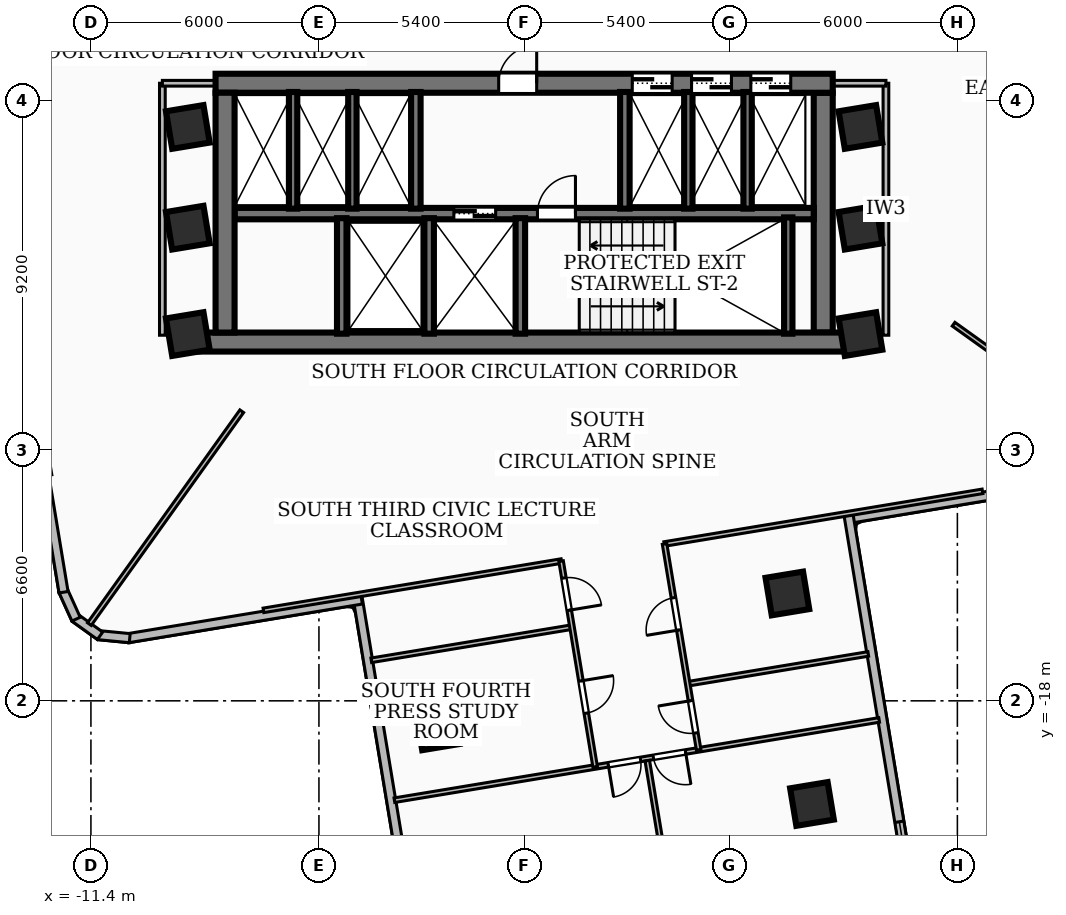
"""IFC4 building model, lengths in metres.
Left out: names, types, materials, properties, quantities, classifications, styles, units other than length and angle.
Written with IfcOpenShell. Run it as: python <this file> out.ifc"""

import sys

from ifc_helpers import new_model, si_unit, direction, frame, frame_2d, origin, origin_2d, place, context, subcontext, project, spatial, rectangle, extrude, element, fill, save


model = new_model("IFC4")
c1 = context("Model", 3, precision=1e-05, world=origin(), true_north=direction((0.0, 1.0)))
c2 = subcontext(c1, "Body", "Model", "MODEL_VIEW")
j1 = project(units=[si_unit("LENGTHUNIT", "METRE"), si_unit("PLANEANGLEUNIT", "RADIAN")], contexts=[c1])
p1 = place(None, origin())
s1 = spatial("IfcSite", under=j1, at=p1, CompositionType="ELEMENT")
p2 = place(p1, origin())
s2 = spatial("IfcBuilding", under=s1, at=p2, CompositionType="ELEMENT")
p3 = place(p2, frame((0.0, 0.0, 92.88)))
s3 = spatial("IfcBuildingStorey", under=s2, at=p3, CompositionType="ELEMENT", Elevation=92.88)
p4 = place(p3, frame((8.78, -8.56, 0.0), z_axis=(0.0, 0.0, 1.0), x_axis=(-1.0, 0.0, 0.0)))
e1 = element("IfcWall", 1, at=p4, inside=s3, PredefinedType="SHEAR", context=c2, shape_type="SweptSolid", body=[
    extrude(rectangle(XDim=17.56, YDim=0.5, at=frame_2d((8.78, 0.0))), origin(), (0.0, 0.0, 1.0), 3.34),
])
p5 = place(p3, frame((-8.12, -1.75, 0.0), z_axis=(0.0, 0.0, 1.0), x_axis=(1.0, 0.0, 0.0)))
e2 = element("IfcWall", 2, at=p5, inside=s3, PredefinedType="SHEAR", context=c2, shape_type="SweptSolid", body=[
    extrude(rectangle(XDim=16.24, YDim=0.5, at=frame_2d((8.12, 0.0))), origin(), (0.0, 0.0, 1.0), 3.34),
])
p6 = place(p5, frame((7.45, 0.0, 0.0)))
e3 = element("IfcOpeningElement", 3, at=p6, cuts=e2, PredefinedType="OPENING", context=c2, shape_type="SweptSolid", body=[
    extrude(rectangle(XDim=1.0, YDim=2.1, at=frame_2d((0.5, 1.05))), frame((0.0, 0.26, 0.0), z_axis=(0.0, -1.0, 0.0), x_axis=(1.0, 0.0, 0.0)), (0.0, 0.0, 1.0), 0.52),
])
p7 = place(p5, frame((10.965, 0.0, 0.0)))
e4 = element("IfcOpeningElement", 4, at=p7, cuts=e2, PredefinedType="OPENING", context=c2, shape_type="SweptSolid", body=[
    extrude(rectangle(XDim=1.05, YDim=2.15, at=frame_2d((0.525, 1.075))), frame((0.0, 0.26, 0.0), z_axis=(0.0, -1.0, 0.0), x_axis=(1.0, 0.0, 0.0)), (0.0, 0.0, 1.0), 0.52),
])
p8 = place(p5, frame((12.525, 0.0, 0.0)))
e5 = element("IfcOpeningElement", 5, at=p8, cuts=e2, PredefinedType="OPENING", context=c2, shape_type="SweptSolid", body=[
    extrude(rectangle(XDim=1.05, YDim=2.15, at=frame_2d((0.525, 1.075))), frame((0.0, 0.26, 0.0), z_axis=(0.0, -1.0, 0.0), x_axis=(1.0, 0.0, 0.0)), (0.0, 0.0, 1.0), 0.52),
])
p9 = place(p5, frame((14.085, 0.0, 0.0)))
e6 = element("IfcOpeningElement", 6, at=p9, cuts=e2, PredefinedType="OPENING", context=c2, shape_type="SweptSolid", body=[
    extrude(rectangle(XDim=1.05, YDim=2.15, at=frame_2d((0.525, 1.075))), frame((0.0, 0.26, 0.0), z_axis=(0.0, -1.0, 0.0), x_axis=(1.0, 0.0, 0.0)), (0.0, 0.0, 1.0), 0.52),
])
for number, where, z_axis, x_axis in (
    (7, (-7.87, -8.31, 0.0), (0.0, 0.0, 1.0), (0.0, 1.0, 0.0)),
    (8, (7.87, -2.0, 0.0), (0.0, 0.0, 1.0), (0.0, -1.0, 0.0)),
):
    element("IfcWall", number, at=place(p3, frame(where, z_axis=z_axis, x_axis=x_axis)), inside=s3, PredefinedType="SHEAR", context=c2, shape_type="SweptSolid", body=[
        extrude(rectangle(XDim=6.31, YDim=0.5, at=frame_2d((3.155, 0.0))), origin(), (0.0, 0.0, 1.0), 3.34),
    ])
p10 = place(p3, frame((-7.62, -5.18, 0.0), z_axis=(0.0, 0.0, 1.0), x_axis=(1.0, 0.0, 0.0)))
e9 = element("IfcWall", 9, at=p10, inside=s3, PredefinedType="SOLIDWALL", context=c2, shape_type="SweptSolid", body=[
    extrude(rectangle(XDim=15.24, YDim=0.3, at=frame_2d((7.62, 0.0))), origin(), (0.0, 0.0, 1.0), 3.34),
])
p11 = place(p10, frame((5.77, 0.0, 0.0)))
e10 = element("IfcOpeningElement", 10, at=p11, cuts=e9, PredefinedType="OPENING", context=c2, shape_type="SweptSolid", body=[
    extrude(rectangle(XDim=1.1, YDim=2.15, at=frame_2d((0.55, 1.075))), frame((0.0, 0.16, 0.0), z_axis=(0.0, -1.0, 0.0), x_axis=(1.0, 0.0, 0.0)), (0.0, 0.0, 1.0), 0.32),
])
p12 = place(p10, frame((7.97, 0.0, 0.0)))
e11 = element("IfcOpeningElement", 11, at=p12, cuts=e9, PredefinedType="OPENING", context=c2, shape_type="SweptSolid", body=[
    extrude(rectangle(XDim=1.0, YDim=2.1, at=frame_2d((0.5, 1.05))), frame((0.0, 0.16, 0.0), z_axis=(0.0, -1.0, 0.0), x_axis=(1.0, 0.0, 0.0)), (0.0, 0.0, 1.0), 0.32),
])
p13 = place(p3, frame((6.95, -8.34, 0.0), z_axis=(0.0, 0.0, 1.0), x_axis=(0.0, 1.0, 0.0)))
e12 = element("IfcWall", 12, at=p13, inside=s3, PredefinedType="SOLIDWALL", context=c2, shape_type="SweptSolid", body=[
    extrude(rectangle(XDim=3.06, YDim=0.22, at=frame_2d((1.53, 0.0))), origin(), (0.0, 0.0, 1.0), 3.34),
])
for number, where, z_axis, x_axis in (
    (13, (-0.1, -8.34, 0.0), (0.0, 0.0, 1.0), (0.0, 1.0, 0.0)),
    (14, (-2.5, -8.34, 0.0), (0.0, 0.0, 1.0), (0.0, 1.0, 0.0)),
    (15, (-4.8, -8.34, 0.0), (0.0, 0.0, 1.0), (0.0, 1.0, 0.0)),
):
    element("IfcWall", number, at=place(p3, frame(where, z_axis=z_axis, x_axis=x_axis)), inside=s3, PredefinedType="SOLIDWALL", context=c2, shape_type="SweptSolid", body=[
        extrude(rectangle(XDim=3.04, YDim=0.25, at=frame_2d((1.52, 0.0))), origin(), (0.0, 0.0, 1.0), 3.34),
    ])
for number, where, z_axis, x_axis in (
    (16, (-2.85, -5.05, 0.0), (0.0, 0.0, 1.0), (0.0, 1.0, 0.0)),
    (17, (2.65, -5.05, 0.0), (0.0, 0.0, 1.0), (0.0, 1.0, 0.0)),
):
    element("IfcWall", number, at=place(p3, frame(where, z_axis=z_axis, x_axis=x_axis)), inside=s3, PredefinedType="SOLIDWALL", context=c2, shape_type="SweptSolid", body=[
        extrude(rectangle(XDim=3.07, YDim=0.25, at=frame_2d((1.535, 0.0))), origin(), (0.0, 0.0, 1.0), 3.34),
    ])
for number, where, z_axis, x_axis in (
    (18, (4.32, -5.05, 0.0), (0.0, 0.0, 1.0), (0.0, 1.0, 0.0)),
    (19, (5.88, -5.05, 0.0), (0.0, 0.0, 1.0), (0.0, 1.0, 0.0)),
    (20, (-6.08, -5.05, 0.0), (0.0, 0.0, 1.0), (0.0, 1.0, 0.0)),
    (21, (-4.52, -5.05, 0.0), (0.0, 0.0, 1.0), (0.0, 1.0, 0.0)),
):
    element("IfcWall", number, at=place(p3, frame(where, z_axis=z_axis, x_axis=x_axis)), inside=s3, PredefinedType="SOLIDWALL", context=c2, shape_type="SweptSolid", body=[
        extrude(rectangle(XDim=3.07, YDim=0.22, at=frame_2d((1.535, 0.0))), origin(), (0.0, 0.0, 1.0), 3.34),
    ])
for number, where, z_axis, x_axis in (
    (22, (-8.85, -5.55, 0.0), (0.0, 0.0, 1.0), (0.987, 0.163, 0.0)),
    (23, (-8.85, -2.9, 0.0), (0.0, 0.0, 1.0), (0.987, 0.163, 0.0)),
    (24, (8.85, -5.55, 0.0), (0.0, 0.0, 1.0), (0.987, 0.163, 0.0)),
    (25, (8.85, -2.9, 0.0), (0.0, 0.0, 1.0), (0.987, 0.163, 0.0)),
    (26, (8.85, -8.35, 0.0), (0.0, 0.0, 1.0), (0.987, 0.163, 0.0)),
    (27, (-8.85, -8.35, 0.0), (0.0, 0.0, 1.0), (0.987, 0.163, 0.0)),
    (28, (-2.271, -18.724, 0.0), (0.0, 0.0, 1.0), (0.987, 0.163, 0.0)),
    (29, (6.927, -15.175, 0.0), (0.0, 0.0, 1.0), (0.987, 0.163, 0.0)),
    (30, (7.574, -20.714, 0.0), (0.0, 0.0, 1.0), (0.987, 0.163, 0.0)),
):
    element("IfcColumn", number, at=place(p3, frame(where, z_axis=z_axis, x_axis=x_axis)), inside=s3, PredefinedType="COLUMN", context=c2, shape_type="SweptSolid", body=[
        extrude(rectangle(XDim=1.0, YDim=1.0, at=origin_2d()), origin(), (0.0, 0.0, 1.0), 3.6),
    ])
p14 = place(p3, frame((15.142, -12.12, 0.0), z_axis=(0.0, 0.0, 1.0), x_axis=(-0.986586085056, -0.163241835244, 0.0)))
e31 = element("IfcWall", 31, at=p14, inside=s3, PredefinedType="SOLIDWALL", context=c2, shape_type="SweptSolid", body=[
    extrude(rectangle(XDim=6.775, YDim=0.24, at=frame_2d((3.387, 0.0))), origin(), (0.0, 0.0, 1.0), 3.34),
])
p15 = place(p3, frame((8.537, -13.115, 0.0), z_axis=(0.0, 0.0, 1.0), x_axis=(0.16331392199, -0.986574154782, 0.0)))
e32 = element("IfcWall", 32, at=p15, inside=s3, PredefinedType="SOLIDWALL", context=c2, shape_type="SweptSolid", body=[
    extrude(rectangle(XDim=11.677, YDim=0.24, at=frame_2d((5.838, 0.0))), origin(), (0.0, 0.0, 1.0), 3.34),
])
p16 = place(p15, frame((8.177, 0.0, 0.85)))
e33 = element("IfcOpeningElement", 33, at=p16, cuts=e32, PredefinedType="OPENING", context=c2, shape_type="SweptSolid", body=[
    extrude(rectangle(XDim=2.4, YDim=1.65, at=frame_2d((1.2, 0.825))), frame((0.0, 0.13, 0.0), z_axis=(0.0, -1.0, 0.0), x_axis=(1.0, 0.0, 0.0)), (0.0, 0.0, 1.0), 0.26),
])
p17 = place(p3, frame((-2.481, -26.774, 0.0), z_axis=(0.0, 0.0, 1.0), x_axis=(-0.16326282821, 0.986582611303, 0.0)))
e34 = element("IfcWall", 34, at=p17, inside=s3, PredefinedType="SOLIDWALL", context=c2, shape_type="SweptSolid", body=[
    extrude(rectangle(XDim=11.675, YDim=0.24, at=frame_2d((5.837, 0.0))), origin(), (0.0, 0.0, 1.0), 2.486),
])
p18 = place(p3, frame((-4.276, -15.335, 0.0), z_axis=(0.0, 0.0, 1.0), x_axis=(-0.986586851863, -0.16323720082, 0.0)))
e35 = element("IfcWall", 35, at=p18, inside=s3, PredefinedType="SOLIDWALL", context=c2, shape_type="SweptSolid", body=[
    extrude(rectangle(XDim=6.237, YDim=0.24, at=frame_2d((3.118, 0.0))), origin(), (0.0, 0.0, 1.0), 2.486),
])
p19 = place(p3, frame((-10.379, -16.351, 0.0), z_axis=(0.0, 0.0, 1.0), x_axis=(-0.995335447313, 0.096474594184, 0.0)))
e36 = element("IfcWall", 36, at=p19, inside=s3, PredefinedType="SOLIDWALL", context=c2, shape_type="SweptSolid", body=[
    extrude(rectangle(XDim=0.83, YDim=0.24, at=frame_2d((0.415, 0.0))), origin(), (0.0, 0.0, 1.0), 3.34),
])
p20 = place(p3, frame((-11.16, -16.288, 0.0), z_axis=(0.0, 0.0, 1.0), x_axis=(-0.812068662375, 0.583561896965, 0.0)))
e37 = element("IfcWall", 37, at=p20, inside=s3, PredefinedType="SOLIDWALL", context=c2, shape_type="SweptSolid", body=[
    extrude(rectangle(XDim=0.814, YDim=0.24, at=frame_2d((0.407, 0.0))), origin(), (0.0, 0.0, 1.0), 3.34),
])
p21 = place(p3, frame((-11.791, -15.851, 0.0), z_axis=(0.0, 0.0, 1.0), x_axis=(-0.412696106872, 0.910868773958, 0.0)))
e38 = element("IfcWall", 38, at=p21, inside=s3, PredefinedType="SOLIDWALL", context=c2, shape_type="SweptSolid", body=[
    extrude(rectangle(XDim=0.831, YDim=0.24, at=frame_2d((0.416, 0.0))), origin(), (0.0, 0.0, 1.0), 3.34),
])
p22 = place(p3, frame((-12.12, -15.142, 0.0), z_axis=(0.0, 0.0, 1.0), x_axis=(-0.163241835244, 0.986586085056, 0.0)))
e39 = element("IfcWall", 39, at=p22, inside=s3, PredefinedType="SOLIDWALL", context=c2, shape_type="SweptSolid", body=[
    extrude(rectangle(XDim=6.775, YDim=0.24, at=frame_2d((3.387, 0.0))), origin(), (0.0, 0.0, 1.0), 2.644),
])
p23 = place(p3, frame((-9.52, -8.38, 0.0), z_axis=(0.0, 0.0, 1.0), x_axis=(0.0, 1.0, 0.0)))
e40 = element("IfcWall", 40, at=p23, inside=s3, PredefinedType="PARTITIONING", context=c2, shape_type="SweptSolid", body=[
    extrude(rectangle(XDim=6.63, YDim=0.15, at=frame_2d((3.315, 0.0))), origin(), (0.0, 0.0, 1.0), 2.486),
])
p24 = place(p3, frame((-7.85, -1.75, 0.0), z_axis=(0.0, 0.0, 1.0), x_axis=(-1.0, 0.0, 0.0)))
e41 = element("IfcWall", 41, at=p24, inside=s3, PredefinedType="PARTITIONING", context=c2, shape_type="SweptSolid", body=[
    extrude(rectangle(XDim=1.67, YDim=0.15, at=frame_2d((0.835, 0.0))), origin(), (0.0, 0.0, 1.0), 2.405),
])
p25 = place(p3, frame((9.52, -8.38, 0.0), z_axis=(0.0, 0.0, 1.0), x_axis=(0.0, 1.0, 0.0)))
e42 = element("IfcWall", 42, at=p25, inside=s3, PredefinedType="PARTITIONING", context=c2, shape_type="SweptSolid", body=[
    extrude(rectangle(XDim=6.63, YDim=0.15, at=frame_2d((3.315, 0.0))), origin(), (0.0, 0.0, 1.0), 2.486),
])
p26 = place(p3, frame((7.85, -1.75, 0.0), z_axis=(0.0, 0.0, 1.0), x_axis=(1.0, 0.0, 0.0)))
e43 = element("IfcWall", 43, at=p26, inside=s3, PredefinedType="PARTITIONING", context=c2, shape_type="SweptSolid", body=[
    extrude(rectangle(XDim=1.67, YDim=0.15, at=frame_2d((0.835, 0.0))), origin(), (0.0, 0.0, 1.0), 2.405),
])
p27 = place(p3, frame((-7.431, -10.38, 0.0), z_axis=(0.0, 0.0, 1.0), x_axis=(-0.582126278944, -0.813098392178, 0.0)))
e44 = element("IfcWall", 44, at=p27, inside=s3, PredefinedType="PARTITIONING", context=c2, shape_type="SweptSolid", body=[
    extrude(rectangle(XDim=6.889, YDim=0.12, at=frame_2d((3.444, 0.0))), origin(), (0.0, 0.0, 1.0), 2.486),
])
p28 = place(p3, frame((11.3, -8.09, 0.0), z_axis=(0.0, 0.0, 1.0), x_axis=(0.813131268368, -0.582080355623, 0.0)))
e45 = element("IfcWall", 45, at=p28, inside=s3, PredefinedType="PARTITIONING", context=c2, shape_type="SweptSolid", body=[
    extrude(rectangle(XDim=5.757, YDim=0.12, at=frame_2d((2.878, 0.0))), origin(), (0.0, 0.0, 1.0), 3.34),
])
p29 = place(p3, frame((3.686, -13.874, 0.0), z_axis=(0.0, 0.0, 1.0), x_axis=(0.98658138377, 0.163270245909, 0.0)))
e46 = element("IfcWall", 46, at=p29, inside=s3, PredefinedType="PARTITIONING", context=c2, shape_type="SweptSolid", body=[
    extrude(rectangle(XDim=8.489, YDim=0.12, at=frame_2d((4.245, 0.0))), origin(), (0.0, 0.0, 1.0), 2.486),
])
p30 = place(p3, frame((-6.86, -15.62, 0.0), z_axis=(0.0, 0.0, 1.0), x_axis=(0.986575116384, 0.16330811288, 0.0)))
e47 = element("IfcWall", 47, at=p30, inside=s3, PredefinedType="PARTITIONING", context=c2, shape_type="SweptSolid", body=[
    extrude(rectangle(XDim=7.949, YDim=0.12, at=frame_2d((3.974, 0.0))), origin(), (0.0, 0.0, 1.0), 2.486),
])
p31 = place(p3, frame((4.324, -17.549, 0.0), z_axis=(0.0, 0.0, 1.0), x_axis=(0.986580422227, 0.163276056047, 0.0)))
e48 = element("IfcWall", 48, at=p31, inside=s3, PredefinedType="PARTITIONING", context=c2, shape_type="SweptSolid", body=[
    extrude(rectangle(XDim=4.795, YDim=0.12, at=frame_2d((2.398, 0.0))), origin(), (0.0, 0.0, 1.0), 2.486),
])
p32 = place(p3, frame((-4.023, -16.934, 0.0), z_axis=(0.0, 0.0, 1.0), x_axis=(0.986577604904, 0.16329307855, 0.0)))
e49 = element("IfcWall", 49, at=p32, inside=s3, PredefinedType="PARTITIONING", context=c2, shape_type="SweptSolid", body=[
    extrude(rectangle(XDim=5.334, YDim=0.12, at=frame_2d((2.667, 0.0))), origin(), (0.0, 0.0, 1.0), 2.486),
])
p33 = place(p3, frame((4.592, -19.289, 0.0), z_axis=(0.0, 0.0, 1.0), x_axis=(-0.163389271883, 0.986561678677, 0.0)))
e50 = element("IfcWall", 50, at=p33, inside=s3, PredefinedType="PARTITIONING", context=c2, shape_type="SweptSolid", body=[
    extrude(rectangle(XDim=5.49, YDim=0.12, at=frame_2d((2.745, 0.0))), origin(), (0.0, 0.0, 1.0), 3.34),
])
p34 = place(p33, frame((3.195, 0.0, 0.0)))
e51 = element("IfcOpeningElement", 51, at=p34, cuts=e50, PredefinedType="OPENING", context=c2, shape_type="SweptSolid", body=[
    extrude(rectangle(XDim=0.86, YDim=2.04, at=frame_2d((0.43, 1.02))), frame((0.0, 0.07, 0.0), z_axis=(0.0, -1.0, 0.0), x_axis=(1.0, 0.0, 0.0)), (0.0, 0.0, 1.0), 0.14),
])
p35 = place(p33, frame((0.45, 0.0, 0.0)))
e52 = element("IfcOpeningElement", 52, at=p35, cuts=e50, PredefinedType="OPENING", context=c2, shape_type="SweptSolid", body=[
    extrude(rectangle(XDim=0.86, YDim=2.04, at=frame_2d((0.43, 1.02))), frame((0.0, 0.07, 0.0), z_axis=(0.0, -1.0, 0.0), x_axis=(1.0, 0.0, 0.0)), (0.0, 0.0, 1.0), 0.14),
])
p36 = place(p3, frame((0.972, -14.324, 0.0), z_axis=(0.0, 0.0, 1.0), x_axis=(0.163389271883, -0.986561678677, 0.0)))
e53 = element("IfcWall", 53, at=p36, inside=s3, PredefinedType="PARTITIONING", context=c2, shape_type="SweptSolid", body=[
    extrude(rectangle(XDim=5.49, YDim=0.12, at=frame_2d((2.745, 0.0))), origin(), (0.0, 0.0, 1.0), 3.34),
])
p37 = place(p36, frame((0.45, 0.0, 0.0)))
e54 = element("IfcOpeningElement", 54, at=p37, cuts=e53, PredefinedType="OPENING", context=c2, shape_type="SweptSolid", body=[
    extrude(rectangle(XDim=0.86, YDim=2.04, at=frame_2d((0.43, 1.02))), frame((0.0, 0.07, 0.0), z_axis=(0.0, -1.0, 0.0), x_axis=(1.0, 0.0, 0.0)), (0.0, 0.0, 1.0), 0.14),
])
p38 = place(p36, frame((3.195, 0.0, 0.0)))
e55 = element("IfcOpeningElement", 55, at=p38, cuts=e53, PredefinedType="OPENING", context=c2, shape_type="SweptSolid", body=[
    extrude(rectangle(XDim=0.86, YDim=2.04, at=frame_2d((0.43, 1.02))), frame((0.0, 0.07, 0.0), z_axis=(0.0, -1.0, 0.0), x_axis=(1.0, 0.0, 0.0)), (0.0, 0.0, 1.0), 0.14),
])
p39 = place(p3, frame((3.24, -19.574, 0.0), z_axis=(0.0, 0.0, 1.0), x_axis=(0.16336126604, -0.986566316452, 0.0)))
e56 = element("IfcWall", 56, at=p39, inside=s3, PredefinedType="PARTITIONING", context=c2, shape_type="SweptSolid", body=[
    extrude(rectangle(XDim=7.555, YDim=0.12, at=frame_2d((3.777, 0.0))), origin(), (0.0, 0.0, 1.0), 2.832),
])
p40 = place(p3, frame((9.342, -18.503, 0.0), z_axis=(0.0, 0.0, 1.0), x_axis=(-0.98656840645, -0.163348643691, 0.0)))
e57 = element("IfcWall", 57, at=p40, inside=s3, PredefinedType="PARTITIONING", context=c2, shape_type="SweptSolid", body=[
    extrude(rectangle(XDim=12.93, YDim=0.12, at=frame_2d((6.465, 0.0))), origin(), (0.0, 0.0, 1.0), 2.486),
])
p41 = place(p40, frame((6.365, 0.0, 0.0)))
e58 = element("IfcOpeningElement", 58, at=p41, cuts=e57, PredefinedType="OPENING", context=c2, shape_type="SweptSolid", body=[
    extrude(rectangle(XDim=0.86, YDim=2.04, at=frame_2d((0.43, 1.02))), frame((0.0, 0.07, 0.0), z_axis=(0.0, -1.0, 0.0), x_axis=(1.0, 0.0, 0.0)), (0.0, 0.0, 1.0), 0.14),
])
p42 = place(p40, frame((5.164, 0.0, 0.0)))
e59 = element("IfcOpeningElement", 59, at=p42, cuts=e57, PredefinedType="OPENING", context=c2, shape_type="SweptSolid", body=[
    extrude(rectangle(XDim=0.86, YDim=2.04, at=frame_2d((0.43, 1.02))), frame((0.0, 0.07, 0.0), z_axis=(0.0, -1.0, 0.0), x_axis=(1.0, 0.0, 0.0)), (0.0, 0.0, 1.0), 0.14),
])
p43 = place(p16, origin())
e60 = element("IfcWindow", 60, at=p43, inside=s3, PartitioningType="SINGLE_PANEL", PredefinedType="WINDOW", context=c2, shape_type="SweptSolid", body=[
    extrude(rectangle(XDim=2.4, YDim=1.65, at=frame_2d((1.2, 0.825))), frame((0.0, 0.03, 0.0), z_axis=(0.0, -1.0, 0.0), x_axis=(1.0, 0.0, 0.0)), (0.0, 0.0, 1.0), 0.06),
])
fill(e33, e60)
p44 = place(p6, origin())
e61 = element("IfcDoor", 61, at=p44, inside=s3, OperationType="SINGLE_SWING_RIGHT", PredefinedType="DOOR", context=c2, shape_type="SweptSolid", body=[
    extrude(rectangle(XDim=1.0, YDim=2.1, at=frame_2d((0.5, 1.05))), frame((0.0, 0.025, 0.0), z_axis=(0.0, -1.0, 0.0), x_axis=(1.0, 0.0, 0.0)), (0.0, 0.0, 1.0), 0.05),
])
fill(e3, e61)
p45 = place(p11, origin())
e62 = element("IfcDoor", 62, at=p45, inside=s3, OperationType="DOUBLE_DOOR_SLIDING", PredefinedType="DOOR", context=c2, shape_type="SweptSolid", body=[
    extrude(rectangle(XDim=1.1, YDim=2.15, at=frame_2d((0.55, 1.075))), frame((0.0, 0.025, 0.0), z_axis=(0.0, -1.0, 0.0), x_axis=(1.0, 0.0, 0.0)), (0.0, 0.0, 1.0), 0.05),
])
fill(e10, e62)
p46 = place(p12, origin())
e63 = element("IfcDoor", 63, at=p46, inside=s3, OperationType="SINGLE_SWING_RIGHT", PredefinedType="DOOR", context=c2, shape_type="SweptSolid", body=[
    extrude(rectangle(XDim=1.0, YDim=2.1, at=frame_2d((0.5, 1.05))), frame((0.0, 0.025, 0.0), z_axis=(0.0, -1.0, 0.0), x_axis=(1.0, 0.0, 0.0)), (0.0, 0.0, 1.0), 0.05),
])
fill(e11, e63)
p47 = place(p7, origin())
e64 = element("IfcDoor", 64, at=p47, inside=s3, OperationType="DOUBLE_DOOR_SLIDING", PredefinedType="DOOR", context=c2, shape_type="SweptSolid", body=[
    extrude(rectangle(XDim=1.05, YDim=2.15, at=frame_2d((0.525, 1.075))), frame((0.0, 0.025, 0.0), z_axis=(0.0, -1.0, 0.0), x_axis=(1.0, 0.0, 0.0)), (0.0, 0.0, 1.0), 0.05),
])
fill(e4, e64)
p48 = place(p8, origin())
e65 = element("IfcDoor", 65, at=p48, inside=s3, OperationType="DOUBLE_DOOR_SLIDING", PredefinedType="DOOR", context=c2, shape_type="SweptSolid", body=[
    extrude(rectangle(XDim=1.05, YDim=2.15, at=frame_2d((0.525, 1.075))), frame((0.0, 0.025, 0.0), z_axis=(0.0, -1.0, 0.0), x_axis=(1.0, 0.0, 0.0)), (0.0, 0.0, 1.0), 0.05),
])
fill(e5, e65)
p49 = place(p9, origin())
e66 = element("IfcDoor", 66, at=p49, inside=s3, OperationType="DOUBLE_DOOR_SLIDING", PredefinedType="DOOR", context=c2, shape_type="SweptSolid", body=[
    extrude(rectangle(XDim=1.05, YDim=2.15, at=frame_2d((0.525, 1.075))), frame((0.0, 0.025, 0.0), z_axis=(0.0, -1.0, 0.0), x_axis=(1.0, 0.0, 0.0)), (0.0, 0.0, 1.0), 0.05),
])
fill(e6, e66)
p50 = place(p34, origin())
e67 = element("IfcDoor", 67, at=p50, inside=s3, OperationType="SINGLE_SWING_LEFT", PredefinedType="DOOR", context=c2, shape_type="SweptSolid", body=[
    extrude(rectangle(XDim=0.86, YDim=2.04, at=frame_2d((0.43, 1.02))), frame((0.0, 0.025, 0.0), z_axis=(0.0, -1.0, 0.0), x_axis=(1.0, 0.0, 0.0)), (0.0, 0.0, 1.0), 0.05),
])
fill(e51, e67)
p51 = place(p35, origin())
e68 = element("IfcDoor", 68, at=p51, inside=s3, OperationType="SINGLE_SWING_RIGHT", PredefinedType="DOOR", context=c2, shape_type="SweptSolid", body=[
    extrude(rectangle(XDim=0.86, YDim=2.04, at=frame_2d((0.43, 1.02))), frame((0.0, 0.025, 0.0), z_axis=(0.0, -1.0, 0.0), x_axis=(1.0, 0.0, 0.0)), (0.0, 0.0, 1.0), 0.05),
])
fill(e52, e68)
p52 = place(p37, origin())
e69 = element("IfcDoor", 69, at=p52, inside=s3, OperationType="SINGLE_SWING_RIGHT", PredefinedType="DOOR", context=c2, shape_type="SweptSolid", body=[
    extrude(rectangle(XDim=0.86, YDim=2.04, at=frame_2d((0.43, 1.02))), frame((0.0, 0.025, 0.0), z_axis=(0.0, -1.0, 0.0), x_axis=(1.0, 0.0, 0.0)), (0.0, 0.0, 1.0), 0.05),
])
fill(e54, e69)
p53 = place(p38, origin())
e70 = element("IfcDoor", 70, at=p53, inside=s3, OperationType="SINGLE_SWING_LEFT", PredefinedType="DOOR", context=c2, shape_type="SweptSolid", body=[
    extrude(rectangle(XDim=0.86, YDim=2.04, at=frame_2d((0.43, 1.02))), frame((0.0, 0.025, 0.0), z_axis=(0.0, -1.0, 0.0), x_axis=(1.0, 0.0, 0.0)), (0.0, 0.0, 1.0), 0.05),
])
fill(e55, e70)
p54 = place(p41, origin())
e71 = element("IfcDoor", 71, at=p54, inside=s3, OperationType="SINGLE_SWING_RIGHT", PredefinedType="DOOR", context=c2, shape_type="SweptSolid", body=[
    extrude(rectangle(XDim=0.86, YDim=2.04, at=frame_2d((0.43, 1.02))), frame((0.0, 0.025, 0.0), z_axis=(0.0, -1.0, 0.0), x_axis=(1.0, 0.0, 0.0)), (0.0, 0.0, 1.0), 0.05),
])
fill(e58, e71)
p55 = place(p42, origin())
e72 = element("IfcDoor", 72, at=p55, inside=s3, OperationType="SINGLE_SWING_LEFT", PredefinedType="DOOR", context=c2, shape_type="SweptSolid", body=[
    extrude(rectangle(XDim=0.86, YDim=2.04, at=frame_2d((0.43, 1.02))), frame((0.0, 0.025, 0.0), z_axis=(0.0, -1.0, 0.0), x_axis=(1.0, 0.0, 0.0)), (0.0, 0.0, 1.0), 0.05),
])
fill(e59, e72)
save(model, sys.argv[1])
